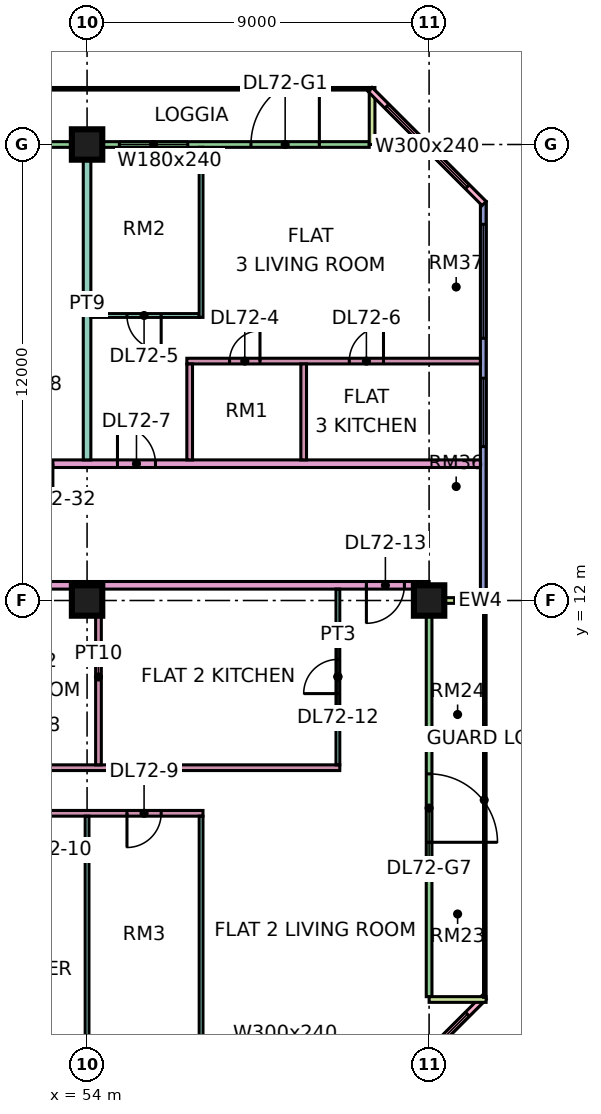
"""IFC4 building model, lengths in metres.
Left out: names, types, materials, properties, quantities, classifications, styles, units other than length and angle.
Written with IfcOpenShell. Run it as: python <this file> out.ifc"""

import sys

from ifc_helpers import new_model, si_unit, direction, frame, frame_2d, origin, origin_2d, place, context, subcontext, project, spatial, rectangle, extrude, element, fill, save


model = new_model("IFC4")
c1 = context("Model", 3, precision=1e-05, world=origin(), true_north=direction((0.0, 1.0)))
c2 = subcontext(c1, "Body", "Model", "MODEL_VIEW")
j1 = project(units=[si_unit("LENGTHUNIT", "METRE"), si_unit("PLANEANGLEUNIT", "RADIAN")], contexts=[c1])
p1 = place(None, origin())
s1 = spatial("IfcSite", under=j1, at=p1, CompositionType="ELEMENT")
p2 = place(p1, origin())
s2 = spatial("IfcBuilding", under=s1, at=p2, CompositionType="ELEMENT")
p3 = place(p2, frame((0.0, 0.0, 307.15)))
s3 = spatial("IfcBuildingStorey", under=s2, at=p3, CompositionType="ELEMENT", Elevation=307.15)
for number, where, z_axis, x_axis in (
    (1, (54.0, 12.0, 0.0), (0.0, 0.0, 1.0), (1.0, 0.0, 0.0)),
    (2, (54.0, 24.0, 0.0), (0.0, 0.0, 1.0), (1.0, 0.0, 0.0)),
    (3, (63.0, 12.0, 0.0), (0.0, 0.0, 1.0), (1.0, 0.0, 0.0)),
):
    element("IfcColumn", number, at=place(p3, frame(where, z_axis=z_axis, x_axis=x_axis)), inside=s3, PredefinedType="COLUMN", context=c2, shape_type="SweptSolid", body=[
        extrude(rectangle(XDim=0.8, YDim=0.8, at=origin_2d()), origin(), (0.0, 0.0, 1.0), 3.75),
    ])
p4 = place(p3, frame((61.425, 24.0, 0.0), z_axis=(0.0, 0.0, 1.0), x_axis=(-1.0, 0.0, 0.0)))
e4 = element("IfcWall", 4, at=p4, inside=s3, PredefinedType="SOLIDWALL", context=c2, shape_type="SweptSolid", body=[
    extrude(rectangle(XDim=13.35, YDim=0.15, at=frame_2d((6.675, 0.0))), origin(), (0.0, 0.0, 1.0), 3.35),
])
p5 = place(p4, frame((1.312, 0.0, 0.0)))
e5 = element("IfcOpeningElement", 5, at=p5, cuts=e4, PredefinedType="OPENING", context=c2, shape_type="SweptSolid", body=[
    extrude(rectangle(XDim=1.8, YDim=2.4, at=frame_2d((0.9, 1.2))), frame((0.0, 0.085, 0.0), z_axis=(0.0, -1.0, 0.0), x_axis=(1.0, 0.0, 0.0)), (0.0, 0.0, 1.0), 0.17),
])
p6 = place(p4, frame((4.775, 0.0, 0.45)))
e6 = element("IfcOpeningElement", 6, at=p6, cuts=e4, PredefinedType="OPENING", context=c2, shape_type="SweptSolid", body=[
    extrude(rectangle(XDim=1.8, YDim=2.4, at=frame_2d((0.9, 1.2))), frame((0.0, 0.085, 0.0), z_axis=(0.0, -1.0, 0.0), x_axis=(1.0, 0.0, 0.0)), (0.0, 0.0, 1.0), 0.17),
])
p7 = place(p4, frame((8.538, 0.0, 0.45)))
e7 = element("IfcOpeningElement", 7, at=p7, cuts=e4, PredefinedType="OPENING", context=c2, shape_type="SweptSolid", body=[
    extrude(rectangle(XDim=4.2, YDim=2.4, at=frame_2d((2.1, 1.2))), frame((0.0, 0.085, 0.0), z_axis=(0.0, -1.0, 0.0), x_axis=(1.0, 0.0, 0.0)), (0.0, 0.0, 1.0), 0.17),
])
p8 = place(p3, frame((61.5, 25.5, 0.0), z_axis=(0.0, 0.0, 1.0), x_axis=(0.0, -1.0, 0.0)))
e8 = element("IfcWall", 8, at=p8, inside=s3, PredefinedType="SOLIDWALL", context=c2, shape_type="SweptSolid", body=[
    extrude(rectangle(XDim=1.5, YDim=0.15, at=frame_2d((0.75, 0.0))), origin(), (0.0, 0.0, 1.0), 3.35),
])
p9 = place(p3, frame((61.447, -1.447, 0.0), z_axis=(0.0, 0.0, 1.0), x_axis=(0.707106781187, 0.707106781187, 0.0)))
e9 = element("IfcWall", 9, at=p9, inside=s3, PredefinedType="SOLIDWALL", context=c2, shape_type="SweptSolid", body=[
    extrude(rectangle(XDim=4.243, YDim=0.15, at=frame_2d((2.121, 0.0))), origin(), (0.0, 0.0, 1.0), 3.35),
])
p10 = place(p9, frame((0.621, 0.0, 0.45)))
e10 = element("IfcOpeningElement", 10, at=p10, cuts=e9, PredefinedType="OPENING", context=c2, shape_type="SweptSolid", body=[
    extrude(rectangle(XDim=3.0, YDim=2.4, at=frame_2d((1.5, 1.2))), frame((0.0, 0.085, 0.0), z_axis=(0.0, -1.0, 0.0), x_axis=(1.0, 0.0, 0.0)), (0.0, 0.0, 1.0), 0.17),
])
p11 = place(p3, frame((63.0, 1.575, 0.0), z_axis=(0.0, 0.0, 1.0), x_axis=(0.0, 1.0, 0.0)))
e11 = element("IfcWall", 11, at=p11, inside=s3, PredefinedType="SOLIDWALL", context=c2, shape_type="SweptSolid", body=[
    extrude(rectangle(XDim=10.35, YDim=0.15, at=frame_2d((5.175, 0.0))), origin(), (0.0, 0.0, 1.0), 3.35),
])
p12 = place(p11, frame((4.062, 0.0, 0.0)))
e12 = element("IfcOpeningElement", 12, at=p12, cuts=e11, PredefinedType="OPENING", context=c2, shape_type="SweptSolid", body=[
    extrude(rectangle(XDim=1.8, YDim=2.4, at=frame_2d((0.9, 1.2))), frame((0.0, 0.085, 0.0), z_axis=(0.0, -1.0, 0.0), x_axis=(1.0, 0.0, 0.0)), (0.0, 0.0, 1.0), 0.17),
])
for number, where, z_axis, x_axis in (
    (13, (64.5, 1.5, 0.0), (0.0, 0.0, 1.0), (-1.0, 0.0, 0.0)),
    (14, (64.5, 12.0, 0.0), (0.0, 0.0, 1.0), (-1.0, 0.0, 0.0)),
):
    element("IfcWall", number, at=place(p3, frame(where, z_axis=z_axis, x_axis=x_axis)), inside=s3, PredefinedType="SOLIDWALL", context=c2, shape_type="SweptSolid", body=[
        extrude(rectangle(XDim=1.5, YDim=0.15, at=frame_2d((0.75, 0.0))), origin(), (0.0, 0.0, 1.0), 3.35),
    ])
p13 = place(p3, frame((64.425, 12.075, 0.0), z_axis=(0.0, 0.0, 1.0), x_axis=(0.0, 1.0, 0.0)))
e15 = element("IfcWall", 15, at=p13, inside=s3, PredefinedType="SOLIDWALL", context=c2, shape_type="SweptSolid", body=[
    extrude(rectangle(XDim=10.425, YDim=0.15, at=frame_2d((5.212, 0.0))), origin(), (0.0, 0.0, 1.0), 3.35),
])
p14 = place(p13, frame((3.975, 0.0, 0.45)))
e16 = element("IfcOpeningElement", 16, at=p14, cuts=e15, PredefinedType="OPENING", context=c2, shape_type="SweptSolid", body=[
    extrude(rectangle(XDim=1.8, YDim=2.4, at=frame_2d((0.9, 1.2))), frame((0.0, 0.085, 0.0), z_axis=(0.0, -1.0, 0.0), x_axis=(1.0, 0.0, 0.0)), (0.0, 0.0, 1.0), 0.17),
])
p15 = place(p13, frame((6.825, 0.0, 0.45)))
e17 = element("IfcOpeningElement", 17, at=p15, cuts=e15, PredefinedType="OPENING", context=c2, shape_type="SweptSolid", body=[
    extrude(rectangle(XDim=3.0, YDim=2.4, at=frame_2d((1.5, 1.2))), frame((0.0, 0.085, 0.0), z_axis=(0.0, -1.0, 0.0), x_axis=(1.0, 0.0, 0.0)), (0.0, 0.0, 1.0), 0.17),
])
p16 = place(p3, frame((64.447, 22.447, 0.0), z_axis=(0.0, 0.0, 1.0), x_axis=(-0.707106781187, 0.707106781187, 0.0)))
e18 = element("IfcWall", 18, at=p16, inside=s3, PredefinedType="SOLIDWALL", context=c2, shape_type="SweptSolid", body=[
    extrude(rectangle(XDim=4.243, YDim=0.15, at=frame_2d((2.121, 0.0))), origin(), (0.0, 0.0, 1.0), 3.35),
])
p17 = place(p16, frame((0.621, 0.0, 0.45)))
e19 = element("IfcOpeningElement", 19, at=p17, cuts=e18, PredefinedType="OPENING", context=c2, shape_type="SweptSolid", body=[
    extrude(rectangle(XDim=3.0, YDim=2.4, at=frame_2d((1.5, 1.2))), frame((0.0, 0.085, 0.0), z_axis=(0.0, -1.0, 0.0), x_axis=(1.0, 0.0, 0.0)), (0.0, 0.0, 1.0), 0.17),
])
p18 = place(p3, frame((40.65, 12.4, 0.0), z_axis=(0.0, 0.0, 1.0), x_axis=(1.0, 0.0, 0.0)))
e20 = element("IfcWall", 20, at=p18, inside=s3, PredefinedType="PARTITIONING", context=c2, shape_type="SweptSolid", body=[
    extrude(rectangle(XDim=22.35, YDim=0.2, at=frame_2d((11.175, 0.0))), origin(), (0.0, 0.0, 1.0), 3.35),
])
p19 = place(p18, frame((20.7, 0.0, 0.0)))
e21 = element("IfcOpeningElement", 21, at=p19, cuts=e20, PredefinedType="OPENING", context=c2, shape_type="SweptSolid", body=[
    extrude(rectangle(XDim=1.0, YDim=2.1, at=frame_2d((0.5, 1.05))), frame((0.0, 0.11, 0.0), z_axis=(0.0, -1.0, 0.0), x_axis=(1.0, 0.0, 0.0)), (0.0, 0.0, 1.0), 0.22),
])
p20 = place(p18, frame((1.05, 0.0, 0.0)))
e22 = element("IfcOpeningElement", 22, at=p20, cuts=e20, PredefinedType="OPENING", context=c2, shape_type="SweptSolid", body=[
    extrude(rectangle(XDim=1.0, YDim=2.1, at=frame_2d((0.5, 1.05))), frame((0.0, 0.11, 0.0), z_axis=(0.0, -1.0, 0.0), x_axis=(1.0, 0.0, 0.0)), (0.0, 0.0, 1.0), 0.22),
])
p21 = place(p3, frame((48.1, 6.4, 0.0), z_axis=(0.0, 0.0, 1.0), x_axis=(1.0, 0.0, 0.0)))
e23 = element("IfcWall", 23, at=p21, inside=s3, PredefinedType="PARTITIONING", context=c2, shape_type="SweptSolid", body=[
    extrude(rectangle(XDim=8.95, YDim=0.15, at=frame_2d((4.475, 0.0))), origin(), (0.0, 0.0, 1.0), 3.35),
])
p22 = place(p21, frame((6.95, 0.0, 0.0)))
e24 = element("IfcOpeningElement", 24, at=p22, cuts=e23, PredefinedType="OPENING", context=c2, shape_type="SweptSolid", body=[
    extrude(rectangle(XDim=0.9, YDim=2.1, at=frame_2d((0.45, 1.05))), frame((0.0, 0.085, 0.0), z_axis=(0.0, -1.0, 0.0), x_axis=(1.0, 0.0, 0.0)), (0.0, 0.0, 1.0), 0.17),
])
p23 = place(p21, frame((3.95, 0.0, 0.0)))
e25 = element("IfcOpeningElement", 25, at=p23, cuts=e23, PredefinedType="OPENING", context=c2, shape_type="SweptSolid", body=[
    extrude(rectangle(XDim=0.9, YDim=2.1, at=frame_2d((0.45, 1.05))), frame((0.0, 0.085, 0.0), z_axis=(0.0, -1.0, 0.0), x_axis=(1.0, 0.0, 0.0)), (0.0, 0.0, 1.0), 0.17),
])
p24 = place(p3, frame((48.1, 7.6, 0.0), z_axis=(0.0, 0.0, 1.0), x_axis=(1.0, 0.0, 0.0)))
e26 = element("IfcWall", 26, at=p24, inside=s3, PredefinedType="PARTITIONING", context=c2, shape_type="SweptSolid", body=[
    extrude(rectangle(XDim=12.55, YDim=0.15, at=frame_2d((6.275, 0.0))), origin(), (0.0, 0.0, 1.0), 3.35),
])
p25 = place(p24, frame((3.9, 0.0, 0.0)))
e27 = element("IfcOpeningElement", 27, at=p25, cuts=e26, PredefinedType="OPENING", context=c2, shape_type="SweptSolid", body=[
    extrude(rectangle(XDim=0.8, YDim=2.1, at=frame_2d((0.4, 1.05))), frame((0.0, 0.085, 0.0), z_axis=(0.0, -1.0, 0.0), x_axis=(1.0, 0.0, 0.0)), (0.0, 0.0, 1.0), 0.17),
])
p26 = place(p24, frame((0.65, 0.0, 0.0)))
e28 = element("IfcOpeningElement", 28, at=p26, cuts=e26, PredefinedType="OPENING", context=c2, shape_type="SweptSolid", body=[
    extrude(rectangle(XDim=0.9, YDim=2.1, at=frame_2d((0.45, 1.05))), frame((0.0, 0.085, 0.0), z_axis=(0.0, -1.0, 0.0), x_axis=(1.0, 0.0, 0.0)), (0.0, 0.0, 1.0), 0.17),
])
p27 = place(p3, frame((51.225, 15.6, 0.0), z_axis=(0.0, 0.0, 1.0), x_axis=(1.0, 0.0, 0.0)))
e29 = element("IfcWall", 29, at=p27, inside=s3, PredefinedType="PARTITIONING", context=c2, shape_type="SweptSolid", body=[
    extrude(rectangle(XDim=13.125, YDim=0.2, at=frame_2d((6.562, 0.0))), origin(), (0.0, 0.0, 1.0), 3.35),
])
p28 = place(p27, frame((3.575, 0.0, 0.0)))
e30 = element("IfcOpeningElement", 30, at=p28, cuts=e29, PredefinedType="OPENING", context=c2, shape_type="SweptSolid", body=[
    extrude(rectangle(XDim=1.0, YDim=2.1, at=frame_2d((0.5, 1.05))), frame((0.0, 0.11, 0.0), z_axis=(0.0, -1.0, 0.0), x_axis=(1.0, 0.0, 0.0)), (0.0, 0.0, 1.0), 0.22),
])
p29 = place(p27, frame((0.875, 0.0, 0.0)))
e31 = element("IfcOpeningElement", 31, at=p29, cuts=e29, PredefinedType="OPENING", context=c2, shape_type="SweptSolid", body=[
    extrude(rectangle(XDim=1.0, YDim=2.1, at=frame_2d((0.5, 1.05))), frame((0.0, 0.11, 0.0), z_axis=(0.0, -1.0, 0.0), x_axis=(1.0, 0.0, 0.0)), (0.0, 0.0, 1.0), 0.22),
])
p30 = place(p3, frame((54.0, 0.074, 0.0), z_axis=(0.0, 0.0, 1.0), x_axis=(0.0, 1.0, 0.0)))
e32 = element("IfcWall", 32, at=p30, inside=s3, PredefinedType="PARTITIONING", context=c2, shape_type="SweptSolid", body=[
    extrude(rectangle(XDim=6.251, YDim=0.1, at=frame_2d((3.125, 0.0))), origin(), (0.0, 0.0, 1.0), 3.35),
])
p31 = place(p3, frame((54.0, 15.7, 0.0), z_axis=(0.0, 0.0, 1.0), x_axis=(0.0, 1.0, 0.0)))
e33 = element("IfcWall", 33, at=p31, inside=s3, PredefinedType="PARTITIONING", context=c2, shape_type="SweptSolid", body=[
    extrude(rectangle(XDim=8.226, YDim=0.2, at=frame_2d((4.113, 0.0))), origin(), (0.0, 0.0, 1.0), 3.35),
])
p32 = place(p3, frame((54.1, 19.5, 0.0), z_axis=(0.0, 0.0, 1.0), x_axis=(1.0, 0.0, 0.0)))
e34 = element("IfcWall", 34, at=p32, inside=s3, PredefinedType="PARTITIONING", context=c2, shape_type="SweptSolid", body=[
    extrude(rectangle(XDim=2.85, YDim=0.1, at=frame_2d((1.425, 0.0))), origin(), (0.0, 0.0, 1.0), 3.35),
])
p33 = place(p32, frame((0.95, 0.0, 0.0)))
e35 = element("IfcOpeningElement", 35, at=p33, cuts=e34, PredefinedType="OPENING", context=c2, shape_type="SweptSolid", body=[
    extrude(rectangle(XDim=0.9, YDim=2.1, at=frame_2d((0.45, 1.05))), frame((0.0, 0.06, 0.0), z_axis=(0.0, -1.0, 0.0), x_axis=(1.0, 0.0, 0.0)), (0.0, 0.0, 1.0), 0.12),
])
p34 = place(p3, frame((54.3, 7.675, 0.0), z_axis=(0.0, 0.0, 1.0), x_axis=(0.0, 1.0, 0.0)))
e36 = element("IfcWall", 36, at=p34, inside=s3, PredefinedType="PARTITIONING", context=c2, shape_type="SweptSolid", body=[
    extrude(rectangle(XDim=4.625, YDim=0.15, at=frame_2d((2.312, 0.0))), origin(), (0.0, 0.0, 1.0), 3.35),
])
p35 = place(p3, frame((56.625, 18.3, 0.0), z_axis=(0.0, 0.0, 1.0), x_axis=(1.0, 0.0, 0.0)))
e37 = element("IfcWall", 37, at=p35, inside=s3, PredefinedType="PARTITIONING", context=c2, shape_type="SweptSolid", body=[
    extrude(rectangle(XDim=7.725, YDim=0.15, at=frame_2d((3.863, 0.0))), origin(), (0.0, 0.0, 1.0), 3.35),
])
p36 = place(p35, frame((1.125, 0.0, 0.0)))
e38 = element("IfcOpeningElement", 38, at=p36, cuts=e37, PredefinedType="OPENING", context=c2, shape_type="SweptSolid", body=[
    extrude(rectangle(XDim=0.8, YDim=2.1, at=frame_2d((0.4, 1.05))), frame((0.0, 0.085, 0.0), z_axis=(0.0, -1.0, 0.0), x_axis=(1.0, 0.0, 0.0)), (0.0, 0.0, 1.0), 0.17),
])
p37 = place(p35, frame((4.275, 0.0, 0.0)))
e39 = element("IfcOpeningElement", 39, at=p37, cuts=e37, PredefinedType="OPENING", context=c2, shape_type="SweptSolid", body=[
    extrude(rectangle(XDim=0.9, YDim=2.1, at=frame_2d((0.45, 1.05))), frame((0.0, 0.085, 0.0), z_axis=(0.0, -1.0, 0.0), x_axis=(1.0, 0.0, 0.0)), (0.0, 0.0, 1.0), 0.17),
])
p38 = place(p3, frame((56.7, 15.7, 0.0), z_axis=(0.0, 0.0, 1.0), x_axis=(0.0, 1.0, 0.0)))
e40 = element("IfcWall", 40, at=p38, inside=s3, PredefinedType="PARTITIONING", context=c2, shape_type="SweptSolid", body=[
    extrude(rectangle(XDim=2.525, YDim=0.15, at=frame_2d((1.263, 0.0))), origin(), (0.0, 0.0, 1.0), 3.35),
])
p39 = place(p3, frame((57.0, 0.074, 0.0), z_axis=(0.0, 0.0, 1.0), x_axis=(0.0, 1.0, 0.0)))
e41 = element("IfcWall", 41, at=p39, inside=s3, PredefinedType="PARTITIONING", context=c2, shape_type="SweptSolid", body=[
    extrude(rectangle(XDim=6.251, YDim=0.1, at=frame_2d((3.125, 0.0))), origin(), (0.0, 0.0, 1.0), 3.35),
])
p40 = place(p3, frame((57.0, 19.45, 0.0), z_axis=(0.0, 0.0, 1.0), x_axis=(0.0, 1.0, 0.0)))
e42 = element("IfcWall", 42, at=p40, inside=s3, PredefinedType="PARTITIONING", context=c2, shape_type="SweptSolid", body=[
    extrude(rectangle(XDim=4.476, YDim=0.1, at=frame_2d((2.238, 0.0))), origin(), (0.0, 0.0, 1.0), 3.35),
])
p41 = place(p3, frame((59.7, 15.7, 0.0), z_axis=(0.0, 0.0, 1.0), x_axis=(0.0, 1.0, 0.0)))
e43 = element("IfcWall", 43, at=p41, inside=s3, PredefinedType="PARTITIONING", context=c2, shape_type="SweptSolid", body=[
    extrude(rectangle(XDim=2.525, YDim=0.15, at=frame_2d((1.263, 0.0))), origin(), (0.0, 0.0, 1.0), 3.35),
])
p42 = place(p3, frame((60.6, 7.675, 0.0), z_axis=(0.0, 0.0, 1.0), x_axis=(0.0, 1.0, 0.0)))
e44 = element("IfcWall", 44, at=p42, inside=s3, PredefinedType="PARTITIONING", context=c2, shape_type="SweptSolid", body=[
    extrude(rectangle(XDim=4.625, YDim=0.1, at=frame_2d((2.312, 0.0))), origin(), (0.0, 0.0, 1.0), 3.35),
])
p43 = place(p42, frame((1.875, 0.0, 0.0)))
e45 = element("IfcOpeningElement", 45, at=p43, cuts=e44, PredefinedType="OPENING", context=c2, shape_type="SweptSolid", body=[
    extrude(rectangle(XDim=0.9, YDim=2.1, at=frame_2d((0.45, 1.05))), frame((0.0, 0.06, 0.0), z_axis=(0.0, -1.0, 0.0), x_axis=(1.0, 0.0, 0.0)), (0.0, 0.0, 1.0), 0.12),
])
p44 = place(p5, frame((1.8, 0.0, 0.0), z_axis=(0.0, 0.0, 1.0), x_axis=(-1.0, 0.0, 0.0)))
e46 = element("IfcDoor", 46, at=p44, inside=s3, OperationType="DOUBLE_DOOR_SINGLE_SWING", PredefinedType="DOOR", context=c2, shape_type="SweptSolid", body=[
    extrude(rectangle(XDim=1.8, YDim=2.4, at=frame_2d((0.9, 1.2))), frame((0.0, 0.025, 0.0), z_axis=(0.0, -1.0, 0.0), x_axis=(1.0, 0.0, 0.0)), (0.0, 0.0, 1.0), 0.05),
])
fill(e5, e46)
p45 = place(p6, origin())
e47 = element("IfcWindow", 47, at=p45, inside=s3, PartitioningType="SINGLE_PANEL", PredefinedType="WINDOW", context=c2, shape_type="SweptSolid", body=[
    extrude(rectangle(XDim=1.8, YDim=2.4, at=frame_2d((0.9, 1.2))), frame((0.0, 0.03, 0.0), z_axis=(0.0, -1.0, 0.0), x_axis=(1.0, 0.0, 0.0)), (0.0, 0.0, 1.0), 0.06),
])
fill(e6, e47)
p46 = place(p10, origin())
e48 = element("IfcWindow", 48, at=p46, inside=s3, PartitioningType="SINGLE_PANEL", PredefinedType="WINDOW", context=c2, shape_type="SweptSolid", body=[
    extrude(rectangle(XDim=3.0, YDim=2.4, at=frame_2d((1.5, 1.2))), frame((0.0, 0.03, 0.0), z_axis=(0.0, -1.0, 0.0), x_axis=(1.0, 0.0, 0.0)), (0.0, 0.0, 1.0), 0.06),
])
fill(e10, e48)
p47 = place(p12, frame((1.8, 0.0, 0.0), z_axis=(0.0, 0.0, 1.0), x_axis=(-1.0, 0.0, 0.0)))
e49 = element("IfcDoor", 49, at=p47, inside=s3, OperationType="DOUBLE_DOOR_SINGLE_SWING", PredefinedType="DOOR", context=c2, shape_type="SweptSolid", body=[
    extrude(rectangle(XDim=1.8, YDim=2.4, at=frame_2d((0.9, 1.2))), frame((0.0, 0.025, 0.0), z_axis=(0.0, -1.0, 0.0), x_axis=(1.0, 0.0, 0.0)), (0.0, 0.0, 1.0), 0.05),
])
fill(e12, e49)
p48 = place(p14, origin())
e50 = element("IfcWindow", 50, at=p48, inside=s3, PartitioningType="SINGLE_PANEL", PredefinedType="WINDOW", context=c2, shape_type="SweptSolid", body=[
    extrude(rectangle(XDim=1.8, YDim=2.4, at=frame_2d((0.9, 1.2))), frame((0.0, 0.03, 0.0), z_axis=(0.0, -1.0, 0.0), x_axis=(1.0, 0.0, 0.0)), (0.0, 0.0, 1.0), 0.06),
])
fill(e16, e50)
p49 = place(p15, origin())
e51 = element("IfcWindow", 51, at=p49, inside=s3, PartitioningType="SINGLE_PANEL", PredefinedType="WINDOW", context=c2, shape_type="SweptSolid", body=[
    extrude(rectangle(XDim=3.0, YDim=2.4, at=frame_2d((1.5, 1.2))), frame((0.0, 0.03, 0.0), z_axis=(0.0, -1.0, 0.0), x_axis=(1.0, 0.0, 0.0)), (0.0, 0.0, 1.0), 0.06),
])
fill(e17, e51)
p50 = place(p17, origin())
e52 = element("IfcWindow", 52, at=p50, inside=s3, PartitioningType="SINGLE_PANEL", PredefinedType="WINDOW", context=c2, shape_type="SweptSolid", body=[
    extrude(rectangle(XDim=3.0, YDim=2.4, at=frame_2d((1.5, 1.2))), frame((0.0, 0.03, 0.0), z_axis=(0.0, -1.0, 0.0), x_axis=(1.0, 0.0, 0.0)), (0.0, 0.0, 1.0), 0.06),
])
fill(e19, e52)
p51 = place(p36, frame((0.8, 0.0, 0.0), z_axis=(0.0, 0.0, 1.0), x_axis=(-1.0, 0.0, 0.0)))
e53 = element("IfcDoor", 53, at=p51, inside=s3, OperationType="SINGLE_SWING_RIGHT", PredefinedType="DOOR", context=c2, shape_type="SweptSolid", body=[
    extrude(rectangle(XDim=0.8, YDim=2.1, at=frame_2d((0.4, 1.05))), frame((0.0, 0.025, 0.0), z_axis=(0.0, -1.0, 0.0), x_axis=(1.0, 0.0, 0.0)), (0.0, 0.0, 1.0), 0.05),
])
fill(e38, e53)
p52 = place(p33, origin())
e54 = element("IfcDoor", 54, at=p52, inside=s3, OperationType="SINGLE_SWING_RIGHT", PredefinedType="DOOR", context=c2, shape_type="SweptSolid", body=[
    extrude(rectangle(XDim=0.9, YDim=2.1, at=frame_2d((0.45, 1.05))), frame((0.0, 0.025, 0.0), z_axis=(0.0, -1.0, 0.0), x_axis=(1.0, 0.0, 0.0)), (0.0, 0.0, 1.0), 0.05),
])
fill(e35, e54)
p53 = place(p37, frame((0.9, 0.0, 0.0), z_axis=(0.0, 0.0, 1.0), x_axis=(-1.0, 0.0, 0.0)))
e55 = element("IfcDoor", 55, at=p53, inside=s3, OperationType="SINGLE_SWING_RIGHT", PredefinedType="DOOR", context=c2, shape_type="SweptSolid", body=[
    extrude(rectangle(XDim=0.9, YDim=2.1, at=frame_2d((0.45, 1.05))), frame((0.0, 0.025, 0.0), z_axis=(0.0, -1.0, 0.0), x_axis=(1.0, 0.0, 0.0)), (0.0, 0.0, 1.0), 0.05),
])
fill(e39, e55)
p54 = place(p28, origin())
e56 = element("IfcDoor", 56, at=p54, inside=s3, OperationType="SINGLE_SWING_LEFT", PredefinedType="DOOR", context=c2, shape_type="SweptSolid", body=[
    extrude(rectangle(XDim=1.0, YDim=2.1, at=frame_2d((0.5, 1.05))), frame((0.0, 0.025, 0.0), z_axis=(0.0, -1.0, 0.0), x_axis=(1.0, 0.0, 0.0)), (0.0, 0.0, 1.0), 0.05),
])
fill(e30, e56)
p55 = place(p22, frame((0.9, 0.0, 0.0), z_axis=(0.0, 0.0, 1.0), x_axis=(-1.0, 0.0, 0.0)))
e57 = element("IfcDoor", 57, at=p55, inside=s3, OperationType="SINGLE_SWING_LEFT", PredefinedType="DOOR", context=c2, shape_type="SweptSolid", body=[
    extrude(rectangle(XDim=0.9, YDim=2.1, at=frame_2d((0.45, 1.05))), frame((0.0, 0.025, 0.0), z_axis=(0.0, -1.0, 0.0), x_axis=(1.0, 0.0, 0.0)), (0.0, 0.0, 1.0), 0.05),
])
fill(e24, e57)
p56 = place(p43, origin())
e58 = element("IfcDoor", 58, at=p56, inside=s3, OperationType="SINGLE_SWING_LEFT", PredefinedType="DOOR", context=c2, shape_type="SweptSolid", body=[
    extrude(rectangle(XDim=0.9, YDim=2.1, at=frame_2d((0.45, 1.05))), frame((0.0, 0.025, 0.0), z_axis=(0.0, -1.0, 0.0), x_axis=(1.0, 0.0, 0.0)), (0.0, 0.0, 1.0), 0.05),
])
fill(e45, e58)
p57 = place(p19, frame((1.0, 0.0, 0.0), z_axis=(0.0, 0.0, 1.0), x_axis=(-1.0, 0.0, 0.0)))
e59 = element("IfcDoor", 59, at=p57, inside=s3, OperationType="SINGLE_SWING_LEFT", PredefinedType="DOOR", context=c2, shape_type="SweptSolid", body=[
    extrude(rectangle(XDim=1.0, YDim=2.1, at=frame_2d((0.5, 1.05))), frame((0.0, 0.025, 0.0), z_axis=(0.0, -1.0, 0.0), x_axis=(1.0, 0.0, 0.0)), (0.0, 0.0, 1.0), 0.05),
])
fill(e21, e59)
p58 = place(p29, origin())
e60 = element("IfcDoor", 60, at=p58, inside=s3, OperationType="SINGLE_SWING_RIGHT", PredefinedType="DOOR", context=c2, shape_type="SweptSolid", body=[
    extrude(rectangle(XDim=1.0, YDim=2.1, at=frame_2d((0.5, 1.05))), frame((0.0, 0.025, 0.0), z_axis=(0.0, -1.0, 0.0), x_axis=(1.0, 0.0, 0.0)), (0.0, 0.0, 1.0), 0.05),
])
fill(e31, e60)
save(model, sys.argv[1])
